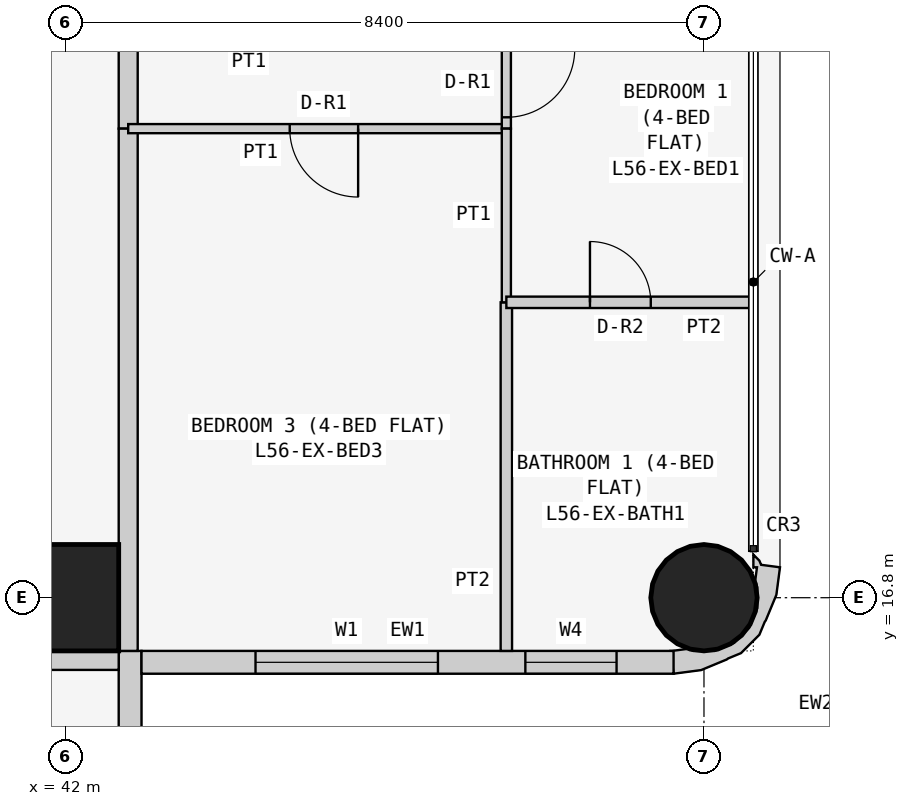
"""IFC4 building model, lengths in metres.
Left out: names, types, materials, properties, quantities, classifications, styles, units other than length and angle.
Written with IfcOpenShell. Run it as: python <this file> out.ifc"""

import sys

from ifc_helpers import new_model, si_unit, direction, frame, frame_2d, origin, origin_2d, place, context, subcontext, project, spatial, polyline, rectangle, circle, outline, extrude, element, fill, save


model = new_model("IFC4")
c1 = context("Model", 3, precision=1e-05, world=origin(), true_north=direction((0.0, 1.0)))
c2 = subcontext(c1, "Body", "Model", "MODEL_VIEW")
j1 = project(units=[si_unit("LENGTHUNIT", "METRE"), si_unit("PLANEANGLEUNIT", "RADIAN")], contexts=[c1])
p1 = place(None, origin())
s1 = spatial("IfcSite", under=j1, at=p1, CompositionType="ELEMENT")
p2 = place(p1, origin())
s2 = spatial("IfcBuilding", under=s1, at=p2, CompositionType="ELEMENT")
p3 = place(p2, frame((0.0, 0.0, 215.7)))
s3 = spatial("IfcBuildingStorey", under=s2, at=p3, CompositionType="ELEMENT", Elevation=215.7)
p4 = place(p3, frame((42.0, 16.8, 0.0), z_axis=(0.0, 0.0, 1.0), x_axis=(1.0, 0.0, 0.0)))
e1 = element("IfcColumn", 1, at=p4, inside=s3, PredefinedType="COLUMN", context=c2, shape_type="SweptSolid", body=[
    extrude(rectangle(XDim=1.4, YDim=1.4, at=origin_2d()), origin(), (0.0, 0.0, 1.0), 3.6),
])
p5 = place(p3, frame((50.4, 16.8, 0.0), z_axis=(0.0, 0.0, 1.0), x_axis=(1.0, 0.0, 0.0)))
e2 = element("IfcColumn", 2, at=p5, inside=s3, PredefinedType="COLUMN", context=c2, shape_type="SweptSolid", body=[
    extrude(circle(Radius=0.7, at=origin_2d()), origin(), (0.0, 0.0, 1.0), 3.6),
])
p6 = place(p3, frame((42.85, 8.8, 0.0), z_axis=(0.0, 0.0, 1.0), x_axis=(0.0, 1.0, 0.0)))
e3 = element("IfcWall", 3, at=p6, inside=s3, PredefinedType="SOLIDWALL", context=c2, shape_type="SweptSolid", body=[
    extrude(rectangle(XDim=7.3, YDim=0.3, at=frame_2d((3.65, 0.0))), origin(), (0.0, 0.0, 1.0), 3.45),
])
p7 = place(p6, frame((3.1, 0.0, 0.9)))
e4 = element("IfcOpeningElement", 4, at=p7, cuts=e3, PredefinedType="OPENING", context=c2, shape_type="SweptSolid", body=[
    extrude(rectangle(XDim=2.4, YDim=1.5, at=frame_2d((1.2, 0.75))), frame((0.0, 0.16, 0.0), z_axis=(0.0, -1.0, 0.0), x_axis=(1.0, 0.0, 0.0)), (0.0, 0.0, 1.0), 0.32),
])
p8 = place(p6, frame((0.75, 0.0, 0.9)))
e5 = element("IfcOpeningElement", 5, at=p8, cuts=e3, PredefinedType="OPENING", context=c2, shape_type="SweptSolid", body=[
    extrude(rectangle(XDim=1.2, YDim=1.5, at=frame_2d((0.6, 0.75))), frame((0.0, 0.16, 0.0), z_axis=(0.0, -1.0, 0.0), x_axis=(1.0, 0.0, 0.0)), (0.0, 0.0, 1.0), 0.32),
])
p9 = place(p3, frame((43.0, 15.95, 0.0), z_axis=(0.0, 0.0, 1.0), x_axis=(1.0, 0.0, 0.0)))
e6 = element("IfcWall", 6, at=p9, inside=s3, PredefinedType="SOLIDWALL", context=c2, shape_type="SweptSolid", body=[
    extrude(rectangle(XDim=7.0, YDim=0.3, at=frame_2d((3.5, 0.0))), origin(), (0.0, 0.0, 1.0), 3.45),
])
p10 = place(p9, frame((1.5, 0.0, 0.9)))
e7 = element("IfcOpeningElement", 7, at=p10, cuts=e6, PredefinedType="OPENING", context=c2, shape_type="SweptSolid", body=[
    extrude(rectangle(XDim=2.4, YDim=1.5, at=frame_2d((1.2, 0.75))), frame((0.0, 0.16, 0.0), z_axis=(0.0, -1.0, 0.0), x_axis=(1.0, 0.0, 0.0)), (0.0, 0.0, 1.0), 0.32),
])
p11 = place(p9, frame((5.05, 0.0, 0.9)))
e8 = element("IfcOpeningElement", 8, at=p11, cuts=e6, PredefinedType="OPENING", context=c2, shape_type="SweptSolid", body=[
    extrude(rectangle(XDim=1.2, YDim=1.5, at=frame_2d((0.6, 0.75))), frame((0.0, 0.16, 0.0), z_axis=(0.0, -1.0, 0.0), x_axis=(1.0, 0.0, 0.0)), (0.0, 0.0, 1.0), 0.32),
])
p12 = place(p3, frame((50.11, 16.076, 0.0), z_axis=(0.0, 0.0, 1.0), x_axis=(0.898030234854, -0.439933741929, 0.0)))
e9 = element("IfcWall", 9, at=p12, inside=s3, PredefinedType="SOLIDWALL", context=c2, shape_type="SweptSolid", body=[
    extrude(outline(polyline([(0.664, 1.577), (0.426, 1.497), (0.382, 1.536), (0.276, 1.572), (0.349, 1.423), (0.392, 1.444), (0.453, 1.261), (0.51, 1.211), (0.632, 0.961), (0.65, 0.683), (0.56, 0.419), (0.375, 0.21), (0.125, 0.087), (0.05, 0.082), (-0.128, -0.035), (-0.145, -0.044), (0.022, -0.296), (0.327, -0.094), (0.568, 0.18), (0.577, 0.199), (0.7, 0.337), (0.811, 0.661), (0.799, 0.846), (0.803, 0.866), (0.78, 1.231), (0.664, 1.577)])), origin(), (0.0, 0.0, 1.0), 3.45),
])
p13 = place(p3, frame((42.825, 24.171, 0.0), z_axis=(0.0, 0.0, 1.0), x_axis=(0.0, -1.0, 0.0)))
e10 = element("IfcWall", 10, at=p13, inside=s3, PredefinedType="PARTITIONING", context=c2, shape_type="SweptSolid", body=[
    extrude(rectangle(XDim=1.2, YDim=0.25, at=frame_2d((0.6, 0.0))), origin(), (0.0, 0.0, 1.0), 3.45),
])
for number, where, z_axis, x_axis in (
    (11, (42.825, 22.971, 0.0), (0.0, 0.0, 1.0), (0.0, -1.0, 0.0)),
    (12, (42.7, 15.975, 0.0), (0.0, 0.0, 1.0), (-1.0, 0.0, 0.0)),
):
    element("IfcWall", number, at=place(p3, frame(where, z_axis=z_axis, x_axis=x_axis)), inside=s3, PredefinedType="PARTITIONING", context=c2, shape_type="SweptSolid", body=[
        extrude(rectangle(XDim=6.871, YDim=0.25, at=frame_2d((3.436, 0.0))), origin(), (0.0, 0.0, 1.0), 3.45),
    ])
p14 = place(p3, frame((47.8, 22.971, 0.0), z_axis=(0.0, 0.0, 1.0), x_axis=(-1.0, 0.0, 0.0)))
e13 = element("IfcWall", 13, at=p14, inside=s3, PredefinedType="PARTITIONING", context=c2, shape_type="SweptSolid", body=[
    extrude(rectangle(XDim=4.975, YDim=0.12, at=frame_2d((2.488, 0.0))), origin(), (0.0, 0.0, 1.0), 3.45),
])
p15 = place(p14, frame((1.95, 0.0, 0.0)))
e14 = element("IfcOpeningElement", 14, at=p15, cuts=e13, PredefinedType="OPENING", context=c2, shape_type="SweptSolid", body=[
    extrude(rectangle(XDim=0.9, YDim=2.1, at=frame_2d((0.45, 1.05))), frame((0.0, 0.07, 0.0), z_axis=(0.0, -1.0, 0.0), x_axis=(1.0, 0.0, 0.0)), (0.0, 0.0, 1.0), 0.14),
])
p16 = place(p3, frame((47.8, 24.171, 0.0), z_axis=(0.0, 0.0, 1.0), x_axis=(0.0, -1.0, 0.0)))
e15 = element("IfcWall", 15, at=p16, inside=s3, PredefinedType="PARTITIONING", context=c2, shape_type="SweptSolid", body=[
    extrude(rectangle(XDim=1.2, YDim=0.12, at=frame_2d((0.6, 0.0))), origin(), (0.0, 0.0, 1.0), 3.45),
])
p17 = place(p16, frame((0.151, 0.0, 0.0)))
e16 = element("IfcOpeningElement", 16, at=p17, cuts=e15, PredefinedType="OPENING", context=c2, shape_type="SweptSolid", body=[
    extrude(rectangle(XDim=0.9, YDim=2.1, at=frame_2d((0.45, 1.05))), frame((0.0, 0.07, 0.0), z_axis=(0.0, -1.0, 0.0), x_axis=(1.0, 0.0, 0.0)), (0.0, 0.0, 1.0), 0.14),
])
p18 = place(p3, frame((47.8, 16.1, 0.0), z_axis=(0.0, 0.0, 1.0), x_axis=(0.0, 1.0, 0.0)))
e17 = element("IfcWall", 17, at=p18, inside=s3, PredefinedType="PARTITIONING", context=c2, shape_type="SweptSolid", body=[
    extrude(rectangle(XDim=4.586, YDim=0.15, at=frame_2d((2.293, 0.0))), origin(), (0.0, 0.0, 1.0), 3.45),
])
p19 = place(p3, frame((47.8, 20.686, 0.0), z_axis=(0.0, 0.0, 1.0), x_axis=(0.0, 1.0, 0.0)))
e18 = element("IfcWall", 18, at=p19, inside=s3, PredefinedType="PARTITIONING", context=c2, shape_type="SweptSolid", body=[
    extrude(rectangle(XDim=2.285, YDim=0.12, at=frame_2d((1.143, 0.0))), origin(), (0.0, 0.0, 1.0), 3.45),
])
p20 = place(p3, frame((51.05, 20.686, 0.0), z_axis=(0.0, 0.0, 1.0), x_axis=(-1.0, 0.0, 0.0)))
e19 = element("IfcWall", 19, at=p20, inside=s3, PredefinedType="PARTITIONING", context=c2, shape_type="SweptSolid", body=[
    extrude(rectangle(XDim=3.25, YDim=0.15, at=frame_2d((1.625, 0.0))), origin(), (0.0, 0.0, 1.0), 3.45),
])
p21 = place(p20, frame((1.35, 0.0, 0.0)))
e20 = element("IfcOpeningElement", 20, at=p21, cuts=e19, PredefinedType="OPENING", context=c2, shape_type="SweptSolid", body=[
    extrude(rectangle(XDim=0.8, YDim=2.1, at=frame_2d((0.4, 1.05))), frame((0.0, 0.085, 0.0), z_axis=(0.0, -1.0, 0.0), x_axis=(1.0, 0.0, 0.0)), (0.0, 0.0, 1.0), 0.17),
])
p22 = place(p10, origin())
e21 = element("IfcWindow", 21, at=p22, inside=s3, PartitioningType="SINGLE_PANEL", PredefinedType="WINDOW", context=c2, shape_type="SweptSolid", body=[
    extrude(rectangle(XDim=2.4, YDim=1.5, at=frame_2d((1.2, 0.75))), frame((0.0, 0.03, 0.0), z_axis=(0.0, -1.0, 0.0), x_axis=(1.0, 0.0, 0.0)), (0.0, 0.0, 1.0), 0.06),
])
fill(e7, e21)
p23 = place(p11, origin())
e22 = element("IfcWindow", 22, at=p23, inside=s3, PartitioningType="SINGLE_PANEL", PredefinedType="WINDOW", context=c2, shape_type="SweptSolid", body=[
    extrude(rectangle(XDim=1.2, YDim=1.5, at=frame_2d((0.6, 0.75))), frame((0.0, 0.03, 0.0), z_axis=(0.0, -1.0, 0.0), x_axis=(1.0, 0.0, 0.0)), (0.0, 0.0, 1.0), 0.06),
])
fill(e8, e22)
p24 = place(p15, origin())
e23 = element("IfcDoor", 23, at=p24, inside=s3, OperationType="SINGLE_SWING_LEFT", PredefinedType="DOOR", context=c2, shape_type="SweptSolid", body=[
    extrude(rectangle(XDim=0.9, YDim=2.1, at=frame_2d((0.45, 1.05))), frame((0.0, 0.025, 0.0), z_axis=(0.0, -1.0, 0.0), x_axis=(1.0, 0.0, 0.0)), (0.0, 0.0, 1.0), 0.05),
])
fill(e14, e23)
p25 = place(p17, origin())
e24 = element("IfcDoor", 24, at=p25, inside=s3, OperationType="SINGLE_SWING_LEFT", PredefinedType="DOOR", context=c2, shape_type="SweptSolid", body=[
    extrude(rectangle(XDim=0.9, YDim=2.1, at=frame_2d((0.45, 1.05))), frame((0.0, 0.025, 0.0), z_axis=(0.0, -1.0, 0.0), x_axis=(1.0, 0.0, 0.0)), (0.0, 0.0, 1.0), 0.05),
])
fill(e16, e24)
p26 = place(p21, frame((0.8, 0.0, 0.0), z_axis=(0.0, 0.0, 1.0), x_axis=(-1.0, 0.0, 0.0)))
e25 = element("IfcDoor", 25, at=p26, inside=s3, OperationType="SINGLE_SWING_LEFT", PredefinedType="DOOR", context=c2, shape_type="SweptSolid", body=[
    extrude(rectangle(XDim=0.8, YDim=2.1, at=frame_2d((0.4, 1.05))), frame((0.0, 0.025, 0.0), z_axis=(0.0, -1.0, 0.0), x_axis=(1.0, 0.0, 0.0)), (0.0, 0.0, 1.0), 0.05),
])
fill(e20, e25)
save(model, sys.argv[1])
